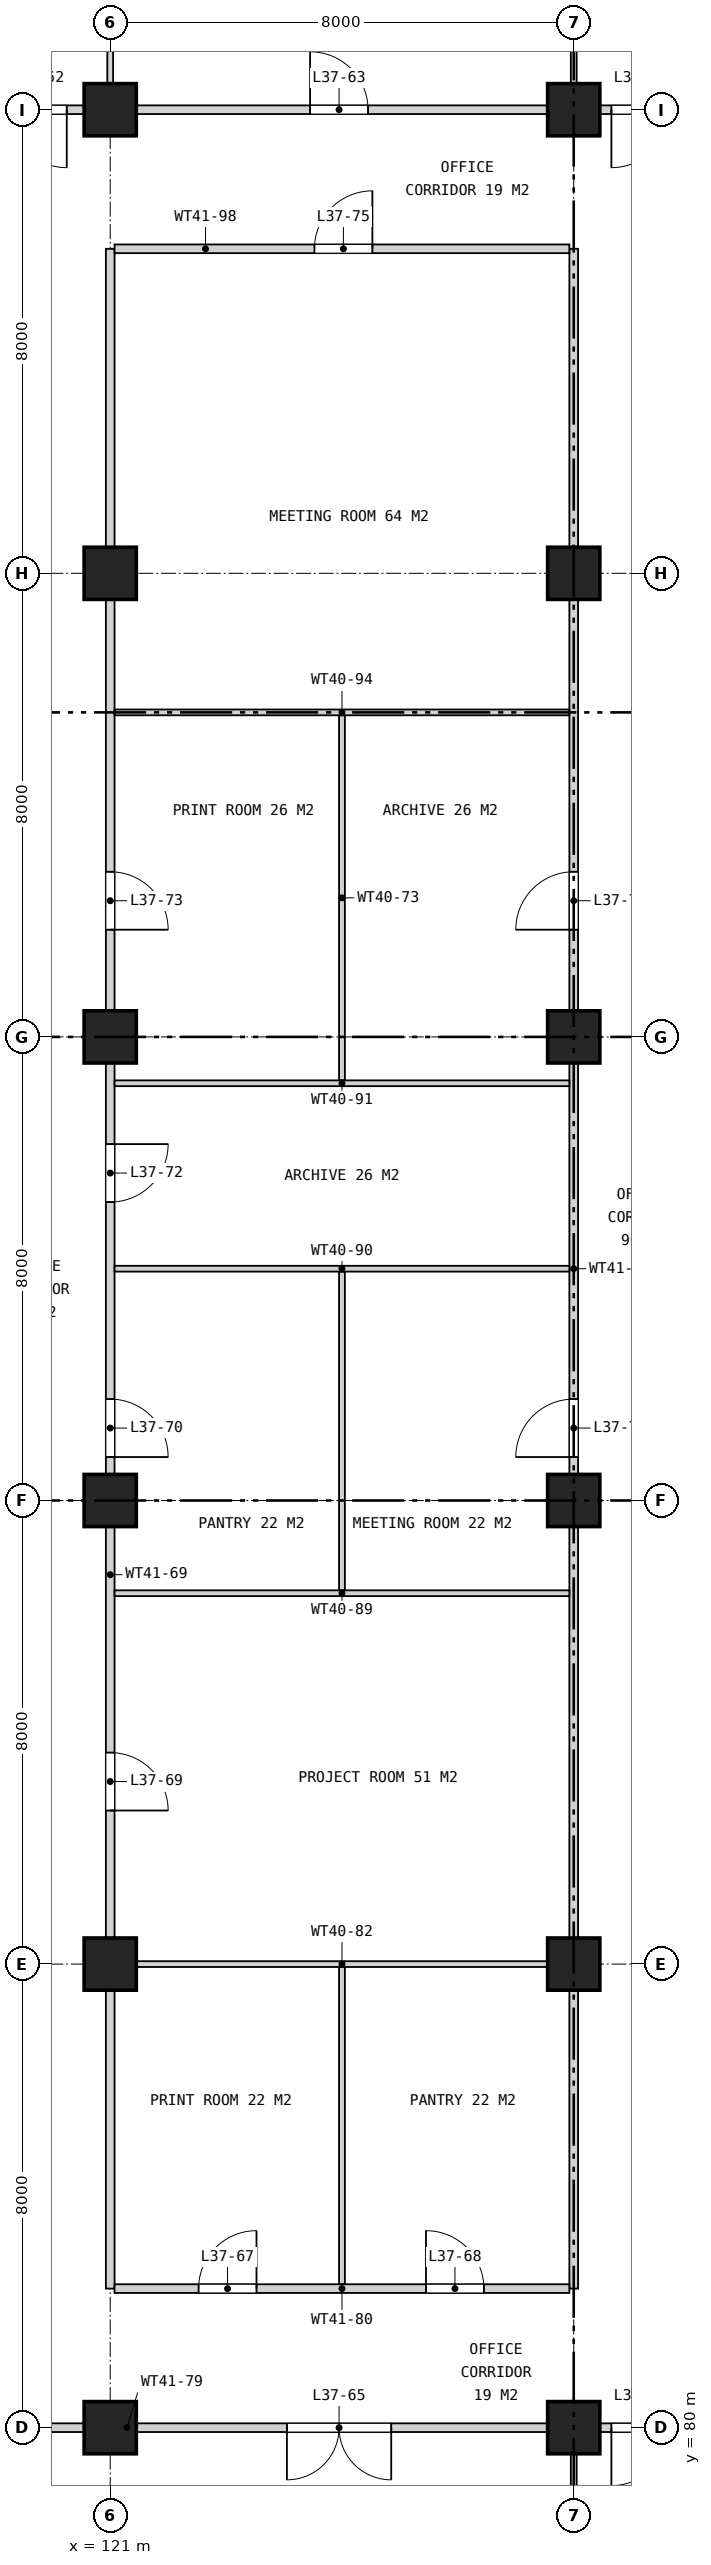
"""IFC4 building model, lengths in metres.
Left out: names, types, materials, properties, quantities, classifications, styles, units other than length and angle.
Written with IfcOpenShell. Run it as: python <this file> out.ifc"""

import sys

from ifc_helpers import new_model, si_unit, direction, frame, frame_2d, origin, origin_2d, place, context, subcontext, project, spatial, rectangle, extrude, element, fill, save


model = new_model("IFC4")
c1 = context("Model", 3, precision=1e-05, world=origin(), true_north=direction((0.0, 1.0)))
c2 = subcontext(c1, "Body", "Model", "MODEL_VIEW")
j1 = project(units=[si_unit("LENGTHUNIT", "METRE"), si_unit("PLANEANGLEUNIT", "RADIAN")], contexts=[c1])
p1 = place(None, origin())
s1 = spatial("IfcSite", under=j1, at=p1, CompositionType="ELEMENT")
p2 = place(p1, origin())
s2 = spatial("IfcBuilding", under=s1, at=p2, CompositionType="ELEMENT")
p3 = place(p2, frame((0.0, 0.0, 178.9)))
s3 = spatial("IfcBuildingStorey", under=s2, at=p3, CompositionType="ELEMENT", Elevation=178.9)
for number, where, z_axis, x_axis in (
    (1, (121.0, 80.0, 0.0), (0.0, 0.0, 1.0), (1.0, 0.0, 0.0)),
    (2, (121.0, 88.0, 0.0), (0.0, 0.0, 1.0), (1.0, 0.0, 0.0)),
    (3, (121.0, 96.0, 0.0), (0.0, 0.0, 1.0), (1.0, 0.0, 0.0)),
    (4, (121.0, 104.0, 0.0), (0.0, 0.0, 1.0), (1.0, 0.0, 0.0)),
    (5, (121.0, 112.0, 0.0), (0.0, 0.0, 1.0), (1.0, 0.0, 0.0)),
    (6, (121.0, 120.0, 0.0), (0.0, 0.0, 1.0), (1.0, 0.0, 0.0)),
    (7, (129.0, 80.0, 0.0), (0.0, 0.0, 1.0), (1.0, 0.0, 0.0)),
    (8, (129.0, 88.0, 0.0), (0.0, 0.0, 1.0), (1.0, 0.0, 0.0)),
    (9, (129.0, 96.0, 0.0), (0.0, 0.0, 1.0), (1.0, 0.0, 0.0)),
    (10, (129.0, 104.0, 0.0), (0.0, 0.0, 1.0), (1.0, 0.0, 0.0)),
    (11, (129.0, 112.0, 0.0), (0.0, 0.0, 1.0), (1.0, 0.0, 0.0)),
    (12, (129.0, 120.0, 0.0), (0.0, 0.0, 1.0), (1.0, 0.0, 0.0)),
):
    element("IfcColumn", number, at=place(p3, frame(where, z_axis=z_axis, x_axis=x_axis)), inside=s3, PredefinedType="COLUMN", context=c2, shape_type="SweptSolid", body=[
        extrude(rectangle(XDim=0.9, YDim=0.9, at=origin_2d()), origin(), (0.0, 0.0, 1.0), 4.2),
    ])
p4 = place(p3, frame((121.0, 82.4, 0.0), z_axis=(0.0, 0.0, 1.0), x_axis=(0.0, 1.0, 0.0)))
e13 = element("IfcWall", 13, at=p4, inside=s3, PredefinedType="PARTITIONING", context=c2, shape_type="SweptSolid", body=[
    extrude(rectangle(XDim=35.2, YDim=0.15, at=frame_2d((17.6, 0.0))), origin(), (0.0, 0.0, 1.0), 3.44),
])
p5 = place(p4, frame((8.25, 0.0, 0.0)))
e14 = element("IfcOpeningElement", 14, at=p5, cuts=e13, PredefinedType="OPENING", context=c2, shape_type="SweptSolid", body=[
    extrude(rectangle(XDim=1.0, YDim=2.1, at=frame_2d((0.5, 1.05))), frame((0.0, 0.085, 0.0), z_axis=(0.0, -1.0, 0.0), x_axis=(1.0, 0.0, 0.0)), (0.0, 0.0, 1.0), 0.17),
])
p6 = place(p4, frame((14.35, 0.0, 0.0)))
e15 = element("IfcOpeningElement", 15, at=p6, cuts=e13, PredefinedType="OPENING", context=c2, shape_type="SweptSolid", body=[
    extrude(rectangle(XDim=1.0, YDim=2.1, at=frame_2d((0.5, 1.05))), frame((0.0, 0.085, 0.0), z_axis=(0.0, -1.0, 0.0), x_axis=(1.0, 0.0, 0.0)), (0.0, 0.0, 1.0), 0.17),
])
p7 = place(p4, frame((18.75, 0.0, 0.0)))
e16 = element("IfcOpeningElement", 16, at=p7, cuts=e13, PredefinedType="OPENING", context=c2, shape_type="SweptSolid", body=[
    extrude(rectangle(XDim=1.0, YDim=2.1, at=frame_2d((0.5, 1.05))), frame((0.0, 0.085, 0.0), z_axis=(0.0, -1.0, 0.0), x_axis=(1.0, 0.0, 0.0)), (0.0, 0.0, 1.0), 0.17),
])
p8 = place(p4, frame((23.45, 0.0, 0.0)))
e17 = element("IfcOpeningElement", 17, at=p8, cuts=e13, PredefinedType="OPENING", context=c2, shape_type="SweptSolid", body=[
    extrude(rectangle(XDim=1.0, YDim=2.1, at=frame_2d((0.5, 1.05))), frame((0.0, 0.085, 0.0), z_axis=(0.0, -1.0, 0.0), x_axis=(1.0, 0.0, 0.0)), (0.0, 0.0, 1.0), 0.17),
])
p9 = place(p3, frame((121.0, 120.075, 0.0), z_axis=(0.0, 0.0, 1.0), x_axis=(0.0, 1.0, 0.0)))
e18 = element("IfcWall", 18, at=p9, inside=s3, PredefinedType="PARTITIONING", context=c2, shape_type="SweptSolid", body=[
    extrude(rectangle(XDim=8.295, YDim=0.1, at=frame_2d((4.147, 0.0))), origin(), (0.0, 0.0, 1.0), 3.44),
])
p10 = place(p3, frame((125.0, 82.475, 0.0), z_axis=(0.0, 0.0, 1.0), x_axis=(0.0, 1.0, 0.0)))
e19 = element("IfcWall", 19, at=p10, inside=s3, PredefinedType="PARTITIONING", context=c2, shape_type="SweptSolid", body=[
    extrude(rectangle(XDim=5.475, YDim=0.1, at=frame_2d((2.737, 0.0))), origin(), (0.0, 0.0, 1.0), 3.44),
])
p11 = place(p3, frame((125.0, 94.45, 0.0), z_axis=(0.0, 0.0, 1.0), x_axis=(0.0, 1.0, 0.0)))
e20 = element("IfcWall", 20, at=p11, inside=s3, PredefinedType="PARTITIONING", context=c2, shape_type="SweptSolid", body=[
    extrude(rectangle(XDim=5.5, YDim=0.1, at=frame_2d((2.75, 0.0))), origin(), (0.0, 0.0, 1.0), 3.44),
])
p12 = place(p3, frame((125.0, 103.25, 0.0), z_axis=(0.0, 0.0, 1.0), x_axis=(0.0, 1.0, 0.0)))
e21 = element("IfcWall", 21, at=p12, inside=s3, PredefinedType="PARTITIONING", context=c2, shape_type="SweptSolid", body=[
    extrude(rectangle(XDim=6.3, YDim=0.1, at=frame_2d((3.15, 0.0))), origin(), (0.0, 0.0, 1.0), 3.44),
])
p13 = place(p3, frame((129.0, 71.63, 0.0), z_axis=(0.0, 0.0, 1.0), x_axis=(0.0, 1.0, 0.0)))
e22 = element("IfcWall", 22, at=p13, inside=s3, PredefinedType="PARTITIONING", context=c2, shape_type="SweptSolid", body=[
    extrude(rectangle(XDim=8.295, YDim=0.1, at=frame_2d((4.147, 0.0))), origin(), (0.0, 0.0, 1.0), 3.44),
])
p14 = place(p3, frame((129.0, 82.4, 0.0), z_axis=(0.0, 0.0, 1.0), x_axis=(0.0, 1.0, 0.0)))
e23 = element("IfcWall", 23, at=p14, inside=s3, PredefinedType="PARTITIONING", context=c2, shape_type="SweptSolid", body=[
    extrude(rectangle(XDim=35.2, YDim=0.15, at=frame_2d((17.6, 0.0))), origin(), (0.0, 0.0, 1.0), 3.44),
])
p15 = place(p14, frame((14.35, 0.0, 0.0)))
e24 = element("IfcOpeningElement", 24, at=p15, cuts=e23, PredefinedType="OPENING", context=c2, shape_type="SweptSolid", body=[
    extrude(rectangle(XDim=1.0, YDim=2.1, at=frame_2d((0.5, 1.05))), frame((0.0, 0.085, 0.0), z_axis=(0.0, -1.0, 0.0), x_axis=(1.0, 0.0, 0.0)), (0.0, 0.0, 1.0), 0.17),
])
p16 = place(p14, frame((23.45, 0.0, 0.0)))
e25 = element("IfcOpeningElement", 25, at=p16, cuts=e23, PredefinedType="OPENING", context=c2, shape_type="SweptSolid", body=[
    extrude(rectangle(XDim=1.0, YDim=2.1, at=frame_2d((0.5, 1.05))), frame((0.0, 0.085, 0.0), z_axis=(0.0, -1.0, 0.0), x_axis=(1.0, 0.0, 0.0)), (0.0, 0.0, 1.0), 0.17),
])
p17 = place(p3, frame((129.0, 120.075, 0.0), z_axis=(0.0, 0.0, 1.0), x_axis=(0.0, 1.0, 0.0)))
e26 = element("IfcWall", 26, at=p17, inside=s3, PredefinedType="PARTITIONING", context=c2, shape_type="SweptSolid", body=[
    extrude(rectangle(XDim=8.295, YDim=0.1, at=frame_2d((4.147, 0.0))), origin(), (0.0, 0.0, 1.0), 3.44),
])
p18 = place(p3, frame((112.63, 80.0, 0.0), z_axis=(0.0, 0.0, 1.0), x_axis=(1.0, 0.0, 0.0)))
e27 = element("IfcWall", 27, at=p18, inside=s3, PredefinedType="PARTITIONING", context=c2, shape_type="SweptSolid", body=[
    extrude(rectangle(XDim=24.74, YDim=0.15, at=frame_2d((12.37, 0.0))), origin(), (0.0, 0.0, 1.0), 3.44),
])
p19 = place(p18, frame((11.42, 0.0, 0.0)))
e28 = element("IfcOpeningElement", 28, at=p19, cuts=e27, PredefinedType="OPENING", context=c2, shape_type="SweptSolid", body=[
    extrude(rectangle(XDim=1.8, YDim=2.1, at=frame_2d((0.9, 1.05))), frame((0.0, 0.085, 0.0), z_axis=(0.0, -1.0, 0.0), x_axis=(1.0, 0.0, 0.0)), (0.0, 0.0, 1.0), 0.17),
])
p20 = place(p18, frame((17.02, 0.0, 0.0)))
e29 = element("IfcOpeningElement", 29, at=p20, cuts=e27, PredefinedType="OPENING", context=c2, shape_type="SweptSolid", body=[
    extrude(rectangle(XDim=1.0, YDim=2.1, at=frame_2d((0.5, 1.05))), frame((0.0, 0.085, 0.0), z_axis=(0.0, -1.0, 0.0), x_axis=(1.0, 0.0, 0.0)), (0.0, 0.0, 1.0), 0.17),
])
p21 = place(p3, frame((121.075, 82.4, 0.0), z_axis=(0.0, 0.0, 1.0), x_axis=(1.0, 0.0, 0.0)))
e30 = element("IfcWall", 30, at=p21, inside=s3, PredefinedType="PARTITIONING", context=c2, shape_type="SweptSolid", body=[
    extrude(rectangle(XDim=7.85, YDim=0.15, at=frame_2d((3.925, 0.0))), origin(), (0.0, 0.0, 1.0), 3.44),
])
p22 = place(p21, frame((1.45, 0.0, 0.0)))
e31 = element("IfcOpeningElement", 31, at=p22, cuts=e30, PredefinedType="OPENING", context=c2, shape_type="SweptSolid", body=[
    extrude(rectangle(XDim=1.0, YDim=2.1, at=frame_2d((0.5, 1.05))), frame((0.0, 0.085, 0.0), z_axis=(0.0, -1.0, 0.0), x_axis=(1.0, 0.0, 0.0)), (0.0, 0.0, 1.0), 0.17),
])
p23 = place(p21, frame((5.375, 0.0, 0.0)))
e32 = element("IfcOpeningElement", 32, at=p23, cuts=e30, PredefinedType="OPENING", context=c2, shape_type="SweptSolid", body=[
    extrude(rectangle(XDim=1.0, YDim=2.1, at=frame_2d((0.5, 1.05))), frame((0.0, 0.085, 0.0), z_axis=(0.0, -1.0, 0.0), x_axis=(1.0, 0.0, 0.0)), (0.0, 0.0, 1.0), 0.17),
])
for number, where, z_axis, x_axis in (
    (33, (121.075, 88.0, 0.0), (0.0, 0.0, 1.0), (1.0, 0.0, 0.0)),
    (34, (121.075, 94.4, 0.0), (0.0, 0.0, 1.0), (1.0, 0.0, 0.0)),
    (35, (121.075, 100.0, 0.0), (0.0, 0.0, 1.0), (1.0, 0.0, 0.0)),
    (36, (121.075, 103.2, 0.0), (0.0, 0.0, 1.0), (1.0, 0.0, 0.0)),
    (37, (121.075, 109.6, 0.0), (0.0, 0.0, 1.0), (1.0, 0.0, 0.0)),
):
    element("IfcWall", number, at=place(p3, frame(where, z_axis=z_axis, x_axis=x_axis)), inside=s3, PredefinedType="PARTITIONING", context=c2, shape_type="SweptSolid", body=[
        extrude(rectangle(XDim=7.85, YDim=0.1, at=frame_2d((3.925, 0.0))), origin(), (0.0, 0.0, 1.0), 3.44),
    ])
p24 = place(p3, frame((121.075, 117.6, 0.0), z_axis=(0.0, 0.0, 1.0), x_axis=(1.0, 0.0, 0.0)))
e38 = element("IfcWall", 38, at=p24, inside=s3, PredefinedType="PARTITIONING", context=c2, shape_type="SweptSolid", body=[
    extrude(rectangle(XDim=7.85, YDim=0.15, at=frame_2d((3.925, 0.0))), origin(), (0.0, 0.0, 1.0), 3.44),
])
p25 = place(p24, frame((3.45, 0.0, 0.0)))
e39 = element("IfcOpeningElement", 39, at=p25, cuts=e38, PredefinedType="OPENING", context=c2, shape_type="SweptSolid", body=[
    extrude(rectangle(XDim=1.0, YDim=2.1, at=frame_2d((0.5, 1.05))), frame((0.0, 0.085, 0.0), z_axis=(0.0, -1.0, 0.0), x_axis=(1.0, 0.0, 0.0)), (0.0, 0.0, 1.0), 0.17),
])
p26 = place(p3, frame((112.63, 120.0, 0.0), z_axis=(0.0, 0.0, 1.0), x_axis=(1.0, 0.0, 0.0)))
e40 = element("IfcWall", 40, at=p26, inside=s3, PredefinedType="PARTITIONING", context=c2, shape_type="SweptSolid", body=[
    extrude(rectangle(XDim=24.74, YDim=0.15, at=frame_2d((12.37, 0.0))), origin(), (0.0, 0.0, 1.0), 3.44),
])
p27 = place(p26, frame((6.62, 0.0, 0.0)))
e41 = element("IfcOpeningElement", 41, at=p27, cuts=e40, PredefinedType="OPENING", context=c2, shape_type="SweptSolid", body=[
    extrude(rectangle(XDim=1.0, YDim=2.1, at=frame_2d((0.5, 1.05))), frame((0.0, 0.085, 0.0), z_axis=(0.0, -1.0, 0.0), x_axis=(1.0, 0.0, 0.0)), (0.0, 0.0, 1.0), 0.17),
])
p28 = place(p26, frame((11.82, 0.0, 0.0)))
e42 = element("IfcOpeningElement", 42, at=p28, cuts=e40, PredefinedType="OPENING", context=c2, shape_type="SweptSolid", body=[
    extrude(rectangle(XDim=1.0, YDim=2.1, at=frame_2d((0.5, 1.05))), frame((0.0, 0.085, 0.0), z_axis=(0.0, -1.0, 0.0), x_axis=(1.0, 0.0, 0.0)), (0.0, 0.0, 1.0), 0.17),
])
p29 = place(p26, frame((17.02, 0.0, 0.0)))
e43 = element("IfcOpeningElement", 43, at=p29, cuts=e40, PredefinedType="OPENING", context=c2, shape_type="SweptSolid", body=[
    extrude(rectangle(XDim=1.0, YDim=2.1, at=frame_2d((0.5, 1.05))), frame((0.0, 0.085, 0.0), z_axis=(0.0, -1.0, 0.0), x_axis=(1.0, 0.0, 0.0)), (0.0, 0.0, 1.0), 0.17),
])
p30 = place(p27, frame((1.0, 0.0, 0.0), z_axis=(0.0, 0.0, 1.0), x_axis=(-1.0, 0.0, 0.0)))
e44 = element("IfcDoor", 44, at=p30, inside=s3, OperationType="SINGLE_SWING_LEFT", PredefinedType="DOOR", context=c2, shape_type="SweptSolid", body=[
    extrude(rectangle(XDim=1.0, YDim=2.1, at=frame_2d((0.5, 1.05))), frame((0.0, 0.025, 0.0), z_axis=(0.0, -1.0, 0.0), x_axis=(1.0, 0.0, 0.0)), (0.0, 0.0, 1.0), 0.05),
])
fill(e41, e44)
p31 = place(p28, origin())
e45 = element("IfcDoor", 45, at=p31, inside=s3, OperationType="SINGLE_SWING_LEFT", PredefinedType="DOOR", context=c2, shape_type="SweptSolid", body=[
    extrude(rectangle(XDim=1.0, YDim=2.1, at=frame_2d((0.5, 1.05))), frame((0.0, 0.025, 0.0), z_axis=(0.0, -1.0, 0.0), x_axis=(1.0, 0.0, 0.0)), (0.0, 0.0, 1.0), 0.05),
])
fill(e42, e45)
p32 = place(p29, frame((1.0, 0.0, 0.0), z_axis=(0.0, 0.0, 1.0), x_axis=(-1.0, 0.0, 0.0)))
e46 = element("IfcDoor", 46, at=p32, inside=s3, OperationType="SINGLE_SWING_RIGHT", PredefinedType="DOOR", context=c2, shape_type="SweptSolid", body=[
    extrude(rectangle(XDim=1.0, YDim=2.1, at=frame_2d((0.5, 1.05))), frame((0.0, 0.025, 0.0), z_axis=(0.0, -1.0, 0.0), x_axis=(1.0, 0.0, 0.0)), (0.0, 0.0, 1.0), 0.05),
])
fill(e43, e46)
p33 = place(p19, frame((1.8, 0.0, 0.0), z_axis=(0.0, 0.0, 1.0), x_axis=(-1.0, 0.0, 0.0)))
e47 = element("IfcDoor", 47, at=p33, inside=s3, OperationType="DOUBLE_DOOR_SINGLE_SWING", PredefinedType="DOOR", context=c2, shape_type="SweptSolid", body=[
    extrude(rectangle(XDim=1.8, YDim=2.1, at=frame_2d((0.9, 1.05))), frame((0.0, 0.025, 0.0), z_axis=(0.0, -1.0, 0.0), x_axis=(1.0, 0.0, 0.0)), (0.0, 0.0, 1.0), 0.05),
])
fill(e28, e47)
p34 = place(p20, frame((1.0, 0.0, 0.0), z_axis=(0.0, 0.0, 1.0), x_axis=(-1.0, 0.0, 0.0)))
e48 = element("IfcDoor", 48, at=p34, inside=s3, OperationType="SINGLE_SWING_RIGHT", PredefinedType="DOOR", context=c2, shape_type="SweptSolid", body=[
    extrude(rectangle(XDim=1.0, YDim=2.1, at=frame_2d((0.5, 1.05))), frame((0.0, 0.025, 0.0), z_axis=(0.0, -1.0, 0.0), x_axis=(1.0, 0.0, 0.0)), (0.0, 0.0, 1.0), 0.05),
])
fill(e29, e48)
p35 = place(p22, origin())
e49 = element("IfcDoor", 49, at=p35, inside=s3, OperationType="SINGLE_SWING_RIGHT", PredefinedType="DOOR", context=c2, shape_type="SweptSolid", body=[
    extrude(rectangle(XDim=1.0, YDim=2.1, at=frame_2d((0.5, 1.05))), frame((0.0, 0.025, 0.0), z_axis=(0.0, -1.0, 0.0), x_axis=(1.0, 0.0, 0.0)), (0.0, 0.0, 1.0), 0.05),
])
fill(e31, e49)
p36 = place(p23, origin())
e50 = element("IfcDoor", 50, at=p36, inside=s3, OperationType="SINGLE_SWING_LEFT", PredefinedType="DOOR", context=c2, shape_type="SweptSolid", body=[
    extrude(rectangle(XDim=1.0, YDim=2.1, at=frame_2d((0.5, 1.05))), frame((0.0, 0.025, 0.0), z_axis=(0.0, -1.0, 0.0), x_axis=(1.0, 0.0, 0.0)), (0.0, 0.0, 1.0), 0.05),
])
fill(e32, e50)
p37 = place(p5, frame((1.0, 0.0, 0.0), z_axis=(0.0, 0.0, 1.0), x_axis=(-1.0, 0.0, 0.0)))
e51 = element("IfcDoor", 51, at=p37, inside=s3, OperationType="SINGLE_SWING_RIGHT", PredefinedType="DOOR", context=c2, shape_type="SweptSolid", body=[
    extrude(rectangle(XDim=1.0, YDim=2.1, at=frame_2d((0.5, 1.05))), frame((0.0, 0.025, 0.0), z_axis=(0.0, -1.0, 0.0), x_axis=(1.0, 0.0, 0.0)), (0.0, 0.0, 1.0), 0.05),
])
fill(e14, e51)
p38 = place(p6, frame((1.0, 0.0, 0.0), z_axis=(0.0, 0.0, 1.0), x_axis=(-1.0, 0.0, 0.0)))
e52 = element("IfcDoor", 52, at=p38, inside=s3, OperationType="SINGLE_SWING_RIGHT", PredefinedType="DOOR", context=c2, shape_type="SweptSolid", body=[
    extrude(rectangle(XDim=1.0, YDim=2.1, at=frame_2d((0.5, 1.05))), frame((0.0, 0.025, 0.0), z_axis=(0.0, -1.0, 0.0), x_axis=(1.0, 0.0, 0.0)), (0.0, 0.0, 1.0), 0.05),
])
fill(e15, e52)
p39 = place(p15, origin())
e53 = element("IfcDoor", 53, at=p39, inside=s3, OperationType="SINGLE_SWING_LEFT", PredefinedType="DOOR", context=c2, shape_type="SweptSolid", body=[
    extrude(rectangle(XDim=1.0, YDim=2.1, at=frame_2d((0.5, 1.05))), frame((0.0, 0.025, 0.0), z_axis=(0.0, -1.0, 0.0), x_axis=(1.0, 0.0, 0.0)), (0.0, 0.0, 1.0), 0.05),
])
fill(e24, e53)
p40 = place(p7, frame((1.0, 0.0, 0.0), z_axis=(0.0, 0.0, 1.0), x_axis=(-1.0, 0.0, 0.0)))
e54 = element("IfcDoor", 54, at=p40, inside=s3, OperationType="SINGLE_SWING_LEFT", PredefinedType="DOOR", context=c2, shape_type="SweptSolid", body=[
    extrude(rectangle(XDim=1.0, YDim=2.1, at=frame_2d((0.5, 1.05))), frame((0.0, 0.025, 0.0), z_axis=(0.0, -1.0, 0.0), x_axis=(1.0, 0.0, 0.0)), (0.0, 0.0, 1.0), 0.05),
])
fill(e16, e54)
p41 = place(p8, frame((1.0, 0.0, 0.0), z_axis=(0.0, 0.0, 1.0), x_axis=(-1.0, 0.0, 0.0)))
e55 = element("IfcDoor", 55, at=p41, inside=s3, OperationType="SINGLE_SWING_RIGHT", PredefinedType="DOOR", context=c2, shape_type="SweptSolid", body=[
    extrude(rectangle(XDim=1.0, YDim=2.1, at=frame_2d((0.5, 1.05))), frame((0.0, 0.025, 0.0), z_axis=(0.0, -1.0, 0.0), x_axis=(1.0, 0.0, 0.0)), (0.0, 0.0, 1.0), 0.05),
])
fill(e17, e55)
p42 = place(p16, origin())
e56 = element("IfcDoor", 56, at=p42, inside=s3, OperationType="SINGLE_SWING_LEFT", PredefinedType="DOOR", context=c2, shape_type="SweptSolid", body=[
    extrude(rectangle(XDim=1.0, YDim=2.1, at=frame_2d((0.5, 1.05))), frame((0.0, 0.025, 0.0), z_axis=(0.0, -1.0, 0.0), x_axis=(1.0, 0.0, 0.0)), (0.0, 0.0, 1.0), 0.05),
])
fill(e25, e56)
p43 = place(p25, origin())
e57 = element("IfcDoor", 57, at=p43, inside=s3, OperationType="SINGLE_SWING_RIGHT", PredefinedType="DOOR", context=c2, shape_type="SweptSolid", body=[
    extrude(rectangle(XDim=1.0, YDim=2.1, at=frame_2d((0.5, 1.05))), frame((0.0, 0.025, 0.0), z_axis=(0.0, -1.0, 0.0), x_axis=(1.0, 0.0, 0.0)), (0.0, 0.0, 1.0), 0.05),
])
fill(e39, e57)
save(model, sys.argv[1])
